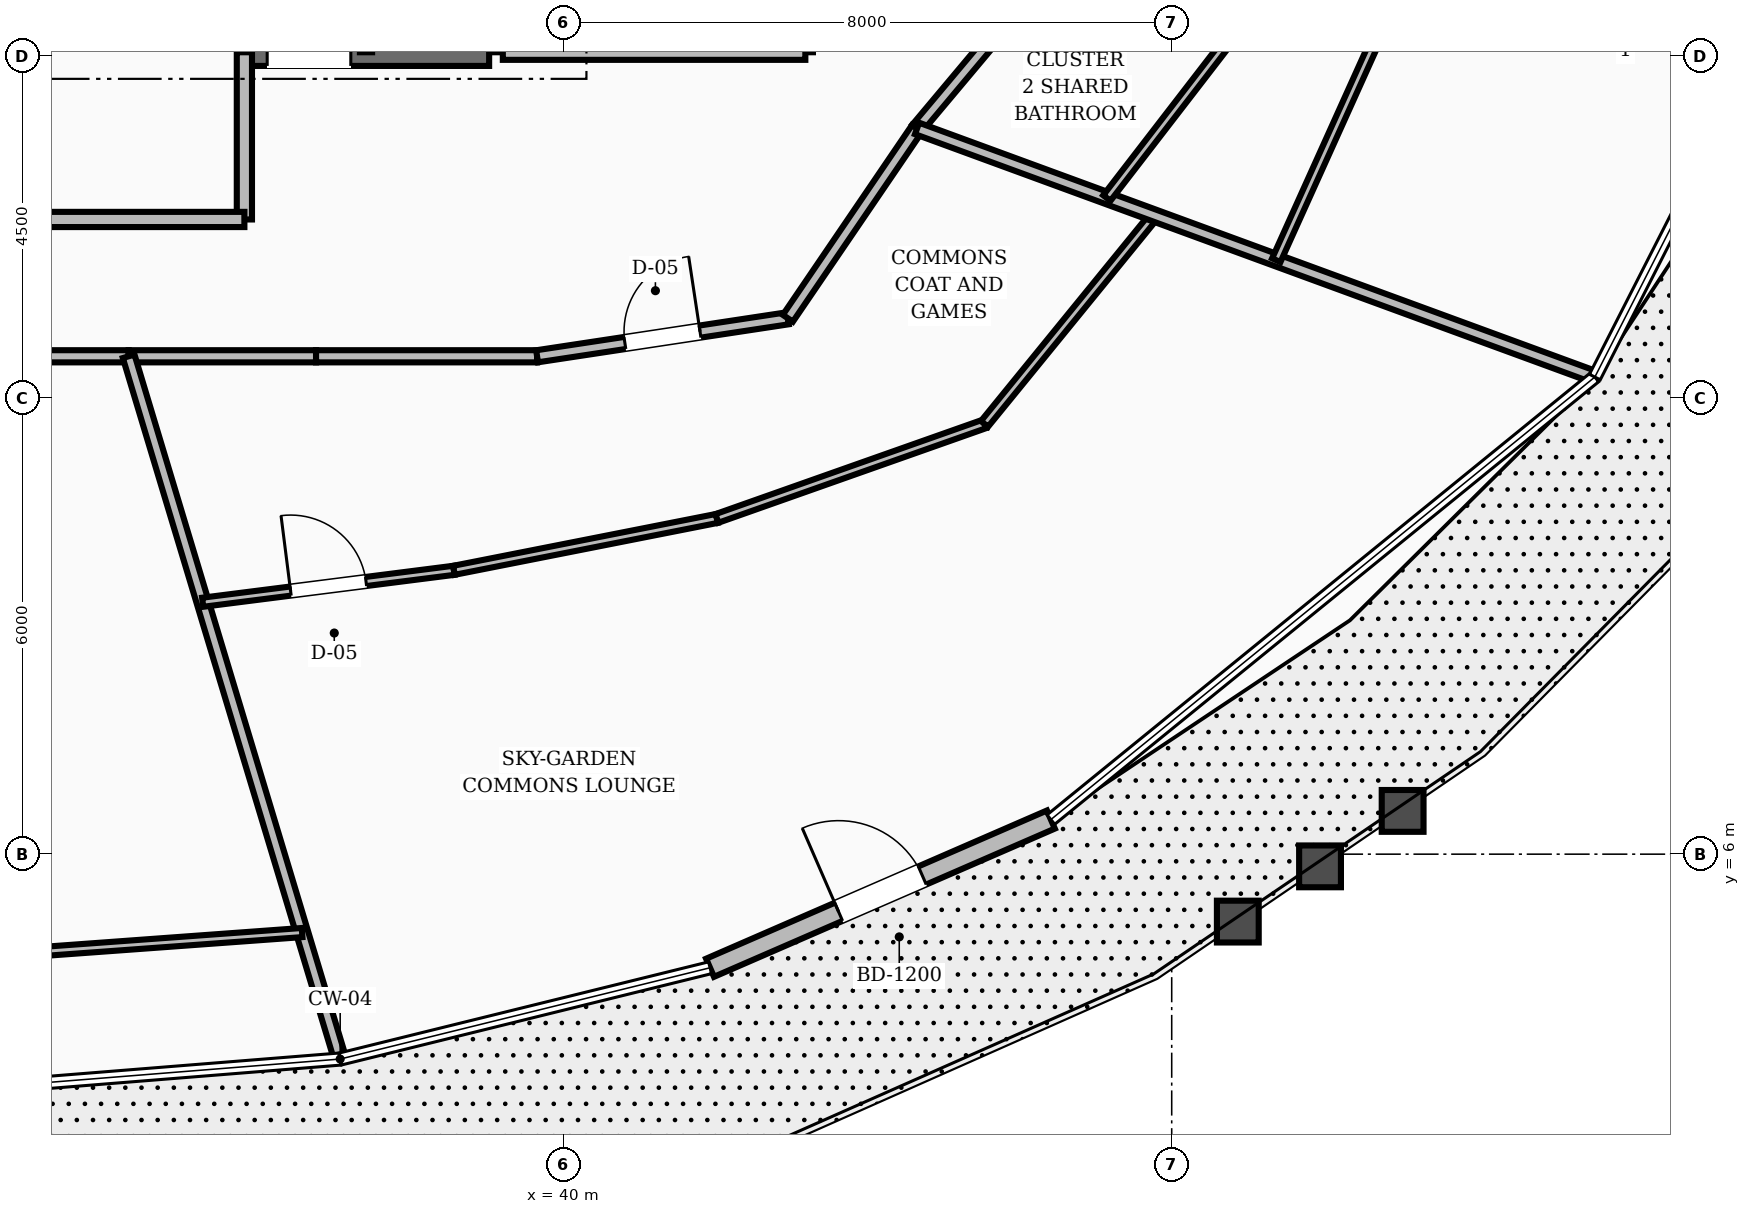
"""IFC4 building model, lengths in metres.
Left out: names, types, materials, properties, quantities, classifications, styles, units other than length and angle.
Written with IfcOpenShell. Run it as: python <this file> out.ifc"""

import sys

from ifc_helpers import new_model, si_unit, direction, frame, frame_2d, origin, place, context, subcontext, project, spatial, rectangle, extrude, element, fill, save


model = new_model("IFC4")
c1 = context("Model", 3, precision=1e-05, world=origin(), true_north=direction((0.0, 1.0)))
c2 = subcontext(c1, "Body", "Model", "MODEL_VIEW")
j1 = project(units=[si_unit("LENGTHUNIT", "METRE"), si_unit("PLANEANGLEUNIT", "RADIAN")], contexts=[c1])
p1 = place(None, origin())
s1 = spatial("IfcSite", under=j1, at=p1, CompositionType="ELEMENT")
p2 = place(p1, origin())
s2 = spatial("IfcBuilding", under=s1, at=p2, CompositionType="ELEMENT")
p3 = place(p2, frame((0.0, 0.0, 138.8)))
s3 = spatial("IfcBuildingStorey", under=s2, at=p3, CompositionType="ELEMENT", Elevation=138.8)
p4 = place(p3, frame((35.8, 16.55, 0.0), z_axis=(0.0, 0.0, 1.0), x_axis=(1.0, 0.0, 0.0)))
e1 = element("IfcWall", 1, at=p4, inside=s3, PredefinedType="SHEAR", context=c2, shape_type="SweptSolid", body=[
    extrude(rectangle(XDim=3.22, YDim=0.36, at=frame_2d((1.61, 0.0))), origin(), (0.0, 0.0, 1.0), 3.6),
])
p5 = place(p4, frame((0.3, 0.0, 0.0)))
e2 = element("IfcOpeningElement", 2, at=p5, cuts=e1, PredefinedType="OPENING", context=c2, shape_type="SweptSolid", body=[
    extrude(rectangle(XDim=1.1, YDim=2.1, at=frame_2d((0.55, 1.05))), frame((0.0, 0.19, 0.0), z_axis=(0.0, -1.0, 0.0), x_axis=(1.0, 0.0, 0.0)), (0.0, 0.0, 1.0), 0.38),
])
p6 = place(p3, frame((41.926, 4.505, 0.0), z_axis=(0.0, 0.0, 1.0), x_axis=(0.917045447223, 0.398782707408, 0.0)))
e3 = element("IfcWall", 3, at=p6, inside=s3, PredefinedType="STANDARD", context=c2, shape_type="SweptSolid", body=[
    extrude(rectangle(XDim=4.89, YDim=0.26, at=frame_2d((2.445, 0.0))), origin(), (0.0, 0.0, 1.0), 2.82),
])
p7 = place(p6, frame((1.845, 0.0, 0.0)))
e4 = element("IfcOpeningElement", 4, at=p7, cuts=e3, PredefinedType="OPENING", context=c2, shape_type="SweptSolid", body=[
    extrude(rectangle(XDim=1.2, YDim=2.15, at=frame_2d((0.6, 1.075))), frame((0.0, 0.14, 0.0), z_axis=(0.0, -1.0, 0.0), x_axis=(1.0, 0.0, 0.0)), (0.0, 0.0, 1.0), 0.28),
])
p8 = place(p3, frame((39.2, 16.55, 0.0), z_axis=(0.0, 0.0, 1.0), x_axis=(1.0, 0.0, 0.0)))
e5 = element("IfcWall", 5, at=p8, inside=s3, PredefinedType="SOLIDWALL", context=c2, shape_type="SweptSolid", body=[
    extrude(rectangle(XDim=3.98, YDim=0.2, at=frame_2d((1.99, 0.0))), origin(), (0.0, 0.0, 1.0), 2.8),
])
p9 = place(p3, frame((35.8, 14.35, 0.0), z_axis=(0.0, 0.0, 1.0), x_axis=(0.0, 1.0, 0.0)))
e6 = element("IfcWall", 6, at=p9, inside=s3, PredefinedType="SOLIDWALL", context=c2, shape_type="SweptSolid", body=[
    extrude(rectangle(XDim=2.2, YDim=0.2, at=frame_2d((1.1, 0.0))), origin(), (0.0, 0.0, 1.0), 2.8),
])
p10 = place(p3, frame((28.2, 14.35, 0.0), z_axis=(0.0, 0.0, 1.0), x_axis=(1.0, 0.0, 0.0)))
e7 = element("IfcWall", 7, at=p10, inside=s3, PredefinedType="SOLIDWALL", context=c2, shape_type="SweptSolid", body=[
    extrude(rectangle(XDim=7.6, YDim=0.2, at=frame_2d((3.8, 0.0))), origin(), (0.0, 0.0, 1.0), 2.8),
])
p11 = place(p10, frame((3.2, 0.0, 0.0)))
e8 = element("IfcOpeningElement", 8, at=p11, cuts=e7, PredefinedType="OPENING", context=c2, shape_type="SweptSolid", body=[
    extrude(rectangle(XDim=1.2, YDim=2.1, at=frame_2d((0.6, 1.05))), frame((0.0, 0.11, 0.0), z_axis=(0.0, -1.0, 0.0), x_axis=(1.0, 0.0, 0.0)), (0.0, 0.0, 1.0), 0.22),
])
p12 = place(p3, frame((32.0, 12.55, 0.0), z_axis=(0.0, 0.0, 1.0), x_axis=(1.0, 0.0, 0.0)))
e9 = element("IfcWall", 9, at=p12, inside=s3, PredefinedType="SOLIDWALL", context=c2, shape_type="SweptSolid", body=[
    extrude(rectangle(XDim=2.278, YDim=0.16, at=frame_2d((1.139, 0.0))), origin(), (0.0, 0.0, 1.0), 2.8),
])
p13 = place(p3, frame((34.278, 12.55, 0.0), z_axis=(0.0, 0.0, 1.0), x_axis=(1.0, 0.0, 0.0)))
e10 = element("IfcWall", 10, at=p13, inside=s3, PredefinedType="SOLIDWALL", context=c2, shape_type="SweptSolid", body=[
    extrude(rectangle(XDim=2.465, YDim=0.16, at=frame_2d((1.232, 0.0))), origin(), (0.0, 0.0, 1.0), 2.8),
])
p14 = place(p3, frame((36.743, 12.55, 0.0), z_axis=(0.0, 0.0, 1.0), x_axis=(1.0, 0.0, 0.0)))
e11 = element("IfcWall", 11, at=p14, inside=s3, PredefinedType="SOLIDWALL", context=c2, shape_type="SweptSolid", body=[
    extrude(rectangle(XDim=2.908, YDim=0.16, at=frame_2d((1.454, 0.0))), origin(), (0.0, 0.0, 1.0), 2.8),
])
p15 = place(p3, frame((39.651, 12.55, 0.0), z_axis=(0.0, 0.0, 1.0), x_axis=(0.988710906508, 0.149835721217, 0.0)))
e12 = element("IfcWall", 12, at=p15, inside=s3, PredefinedType="SOLIDWALL", context=c2, shape_type="SweptSolid", body=[
    extrude(rectangle(XDim=3.337, YDim=0.16, at=frame_2d((1.668, 0.0))), origin(), (0.0, 0.0, 1.0), 2.8),
])
p16 = place(p15, frame((1.168, 0.0, 0.0)))
e13 = element("IfcOpeningElement", 13, at=p16, cuts=e12, PredefinedType="OPENING", context=c2, shape_type="SweptSolid", body=[
    extrude(rectangle(XDim=1.0, YDim=2.1, at=frame_2d((0.5, 1.05))), frame((0.0, 0.09, 0.0), z_axis=(0.0, -1.0, 0.0), x_axis=(1.0, 0.0, 0.0)), (0.0, 0.0, 1.0), 0.18),
])
p17 = place(p3, frame((42.95, 13.05, 0.0), z_axis=(0.0, 0.0, 1.0), x_axis=(0.562674669208, 0.826678423955, 0.0)))
e14 = element("IfcWall", 14, at=p17, inside=s3, PredefinedType="SOLIDWALL", context=c2, shape_type="SweptSolid", body=[
    extrude(rectangle(XDim=3.021, YDim=0.16, at=frame_2d((1.511, 0.0))), origin(), (0.0, 0.0, 1.0), 2.8),
])
p18 = place(p3, frame((44.65, 15.548, 0.0), z_axis=(0.0, 0.0, 1.0), x_axis=(0.642665742791, 0.76614668507, 0.0)))
e15 = element("IfcWall", 15, at=p18, inside=s3, PredefinedType="SOLIDWALL", context=c2, shape_type="SweptSolid", body=[
    extrude(rectangle(XDim=3.112, YDim=0.16, at=frame_2d((1.556, 0.0))), origin(), (0.0, 0.0, 1.0), 2.8),
])
p19 = place(p3, frame((34.278, 12.55, 0.0), z_axis=(0.0, 0.0, 1.0), x_axis=(0.288212907738, -0.957566352695, 0.0)))
e16 = element("IfcWall", 16, at=p19, inside=s3, PredefinedType="SOLIDWALL", context=c2, shape_type="SweptSolid", body=[
    extrude(rectangle(XDim=9.605, YDim=0.16, at=frame_2d((4.802, 0.0))), origin(), (0.0, 0.0, 1.0), 2.8),
])
p20 = place(p3, frame((35.251, 9.314, 0.0), z_axis=(0.0, 0.0, 1.0), x_axis=(0.992017587996, 0.126099584086, 0.0)))
e17 = element("IfcWall", 17, at=p20, inside=s3, PredefinedType="PARTITIONING", context=c2, shape_type="SweptSolid", body=[
    extrude(rectangle(XDim=3.332, YDim=0.12, at=frame_2d((1.666, 0.0))), origin(), (0.0, 0.0, 1.0), 2.8),
])
p21 = place(p20, frame((1.166, 0.0, 0.0)))
e18 = element("IfcOpeningElement", 18, at=p21, cuts=e17, PredefinedType="OPENING", context=c2, shape_type="SweptSolid", body=[
    extrude(rectangle(XDim=1.0, YDim=2.1, at=frame_2d((0.5, 1.05))), frame((0.0, 0.07, 0.0), z_axis=(0.0, -1.0, 0.0), x_axis=(1.0, 0.0, 0.0)), (0.0, 0.0, 1.0), 0.14),
])
p22 = place(p3, frame((38.557, 9.734, 0.0), z_axis=(0.0, 0.0, 1.0), x_axis=(0.981085966932, 0.193572532887, 0.0)))
e19 = element("IfcWall", 19, at=p22, inside=s3, PredefinedType="PARTITIONING", context=c2, shape_type="SweptSolid", body=[
    extrude(rectangle(XDim=3.526, YDim=0.12, at=frame_2d((1.763, 0.0))), origin(), (0.0, 0.0, 1.0), 2.8),
])
p23 = place(p3, frame((42.017, 10.417, 0.0), z_axis=(0.0, 0.0, 1.0), x_axis=(0.942909418958, 0.333049287104, 0.0)))
e20 = element("IfcWall", 20, at=p23, inside=s3, PredefinedType="PARTITIONING", context=c2, shape_type="SweptSolid", body=[
    extrude(rectangle(XDim=3.733, YDim=0.12, at=frame_2d((1.867, 0.0))), origin(), (0.0, 0.0, 1.0), 2.8),
])
p24 = place(p3, frame((45.537, 11.66, 0.0), z_axis=(0.0, 0.0, 1.0), x_axis=(0.631597669675, 0.775296319906, 0.0)))
e21 = element("IfcWall", 21, at=p24, inside=s3, PredefinedType="PARTITIONING", context=c2, shape_type="SweptSolid", body=[
    extrude(rectangle(XDim=3.537, YDim=0.12, at=frame_2d((1.769, 0.0))), origin(), (0.0, 0.0, 1.0), 2.8),
])
p25 = place(p3, frame((44.65, 15.548, 0.0), z_axis=(0.0, 0.0, 1.0), x_axis=(0.938840675632, -0.344351834291, 0.0)))
e22 = element("IfcWall", 22, at=p25, inside=s3, PredefinedType="SOLIDWALL", context=c2, shape_type="SweptSolid", body=[
    extrude(rectangle(XDim=9.448, YDim=0.16, at=frame_2d((4.724, 0.0))), origin(), (0.0, 0.0, 1.0), 2.8),
])
p26 = place(p3, frame((47.147, 14.632, 0.0), z_axis=(0.0, 0.0, 1.0), x_axis=(0.610601059946, 0.791938347091, 0.0)))
e23 = element("IfcWall", 23, at=p26, inside=s3, PredefinedType="PARTITIONING", context=c2, shape_type="SweptSolid", body=[
    extrude(rectangle(XDim=3.457, YDim=0.12, at=frame_2d((1.729, 0.0))), origin(), (0.0, 0.0, 1.0), 2.8),
])
p27 = place(p3, frame((49.376, 13.814, 0.0), z_axis=(0.0, 0.0, 1.0), x_axis=(0.411193017438, 0.911548299549, 0.0)))
e24 = element("IfcWall", 24, at=p27, inside=s3, PredefinedType="PARTITIONING", context=c2, shape_type="SweptSolid", body=[
    extrude(rectangle(XDim=7.278, YDim=0.12, at=frame_2d((3.639, 0.0))), origin(), (0.0, 0.0, 1.0), 2.8),
])
p28 = place(p27, frame((4.363, 0.0, 0.0)))
e25 = element("IfcOpeningElement", 25, at=p28, cuts=e24, PredefinedType="OPENING", context=c2, shape_type="SweptSolid", body=[
    extrude(rectangle(XDim=0.95, YDim=2.1, at=frame_2d((0.475, 1.05))), frame((0.0, 0.07, 0.0), z_axis=(0.0, -1.0, 0.0), x_axis=(1.0, 0.0, 0.0)), (0.0, 0.0, 1.0), 0.14),
])
p29 = place(p3, frame((32.0, 4.636, 0.0), z_axis=(0.0, 0.0, 1.0), x_axis=(0.997351044353, 0.072738533998, 0.0)))
e26 = element("IfcWall", 26, at=p29, inside=s3, PredefinedType="PARTITIONING", context=c2, shape_type="SweptSolid", body=[
    extrude(rectangle(XDim=4.572, YDim=0.12, at=frame_2d((2.286, 0.0))), origin(), (0.0, 0.0, 1.0), 2.8),
])
p30 = place(p7, origin())
e27 = element("IfcDoor", 27, at=p30, inside=s3, OperationType="SINGLE_SWING_LEFT", PredefinedType="DOOR", context=c2, shape_type="SweptSolid", body=[
    extrude(rectangle(XDim=1.2, YDim=2.15, at=frame_2d((0.6, 1.075))), frame((0.0, 0.025, 0.0), z_axis=(0.0, -1.0, 0.0), x_axis=(1.0, 0.0, 0.0)), (0.0, 0.0, 1.0), 0.05),
])
fill(e4, e27)
p31 = place(p5, origin())
e28 = element("IfcDoor", 28, at=p31, inside=s3, OperationType="SINGLE_SWING_RIGHT", PredefinedType="DOOR", context=c2, shape_type="SweptSolid", body=[
    extrude(rectangle(XDim=1.1, YDim=2.1, at=frame_2d((0.55, 1.05))), frame((0.0, 0.025, 0.0), z_axis=(0.0, -1.0, 0.0), x_axis=(1.0, 0.0, 0.0)), (0.0, 0.0, 1.0), 0.05),
])
fill(e2, e28)
p32 = place(p16, origin())
e29 = element("IfcDoor", 29, at=p32, inside=s3, OperationType="SINGLE_SWING_RIGHT", PredefinedType="DOOR", context=c2, shape_type="SweptSolid", body=[
    extrude(rectangle(XDim=1.0, YDim=2.1, at=frame_2d((0.5, 1.05))), frame((0.0, 0.025, 0.0), z_axis=(0.0, -1.0, 0.0), x_axis=(1.0, 0.0, 0.0)), (0.0, 0.0, 1.0), 0.05),
])
fill(e13, e29)
p33 = place(p21, origin())
e30 = element("IfcDoor", 30, at=p33, inside=s3, OperationType="SINGLE_SWING_LEFT", PredefinedType="DOOR", context=c2, shape_type="SweptSolid", body=[
    extrude(rectangle(XDim=1.0, YDim=2.1, at=frame_2d((0.5, 1.05))), frame((0.0, 0.025, 0.0), z_axis=(0.0, -1.0, 0.0), x_axis=(1.0, 0.0, 0.0)), (0.0, 0.0, 1.0), 0.05),
])
fill(e18, e30)
save(model, sys.argv[1])
